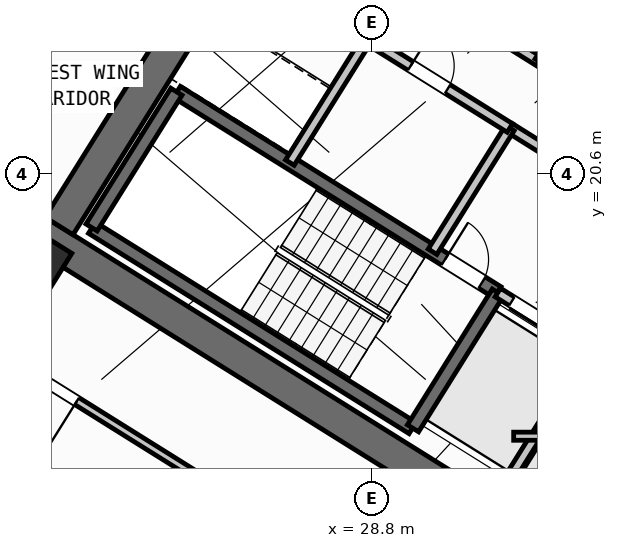
"""IFC4 building model, lengths in metres.
Left out: names, types, materials, properties, quantities, classifications, styles, units other than length and angle.
Written with IfcOpenShell. Run it as: python <this file> out.ifc"""

import sys

from ifc_helpers import new_model, si_unit, direction, frame, frame_2d, origin, origin_2d, place, context, subcontext, project, spatial, rectangle, hollow_rectangle, extrude, source, transform, mapped, element, fill, save


model = new_model("IFC4")
c1 = context("Model", 3, precision=1e-05, world=origin(), true_north=direction((0.0, 1.0)))
c2 = subcontext(c1, "Body", "Model", "MODEL_VIEW")
j1 = project(units=[si_unit("LENGTHUNIT", "METRE"), si_unit("PLANEANGLEUNIT", "RADIAN")], contexts=[c1])
p1 = place(None, origin())
s1 = spatial("IfcSite", under=j1, at=p1, CompositionType="ELEMENT")
p2 = place(p1, origin())
s2 = spatial("IfcBuilding", under=s1, at=p2, CompositionType="ELEMENT")
p3 = place(p2, frame((0.0, 0.0, 24.0)))
s3 = spatial("IfcBuildingStorey", under=s2, at=p3, CompositionType="ELEMENT", Elevation=24.0)
p4 = place(p3, frame((33.409, 12.45, 0.0), z_axis=(0.0, 0.0, 1.0), x_axis=(-0.848051132073, 0.529914405721, 0.0)))
e1 = element("IfcWall", 1, at=p4, inside=s3, PredefinedType="SHEAR", context=c2, shape_type="SweptSolid", body=[
    extrude(rectangle(XDim=13.24, YDim=0.65, at=frame_2d((6.62, 0.0))), origin(), (0.0, 0.0, 1.0), 3.35),
])
p5 = place(p3, frame((26.007, 24.976, 0.0), z_axis=(0.0, 0.0, 1.0), x_axis=(-0.529916319127, -0.848049936456, 0.0)))
e2 = element("IfcWall", 2, at=p5, inside=s3, PredefinedType="SHEAR", context=c2, shape_type="SweptSolid", body=[
    extrude(rectangle(XDim=6.375, YDim=0.65, at=frame_2d((3.188, 0.0))), origin(), (0.0, 0.0, 1.0), 3.35),
])
m1 = source(origin(), c2, "Body", "SweptSolid", [
    extrude(hollow_rectangle(XDim=1.0, YDim=1.0, WallThickness=0.04, at=origin_2d()), origin(), (0.0, 0.0, 1.0), 3.6),
])
p6 = place(p3, frame((22.191, 18.87, 0.0), z_axis=(0.0, 0.0, 1.0), x_axis=(-0.848048096156, 0.529919264233, 0.0)))
e3 = element("IfcColumn", 3, at=p6, inside=s3, PredefinedType="COLUMN", context=c2, shape_type="MappedRepresentation", body=[
    mapped(m1, transform((0.0, 0.0, 0.0), scale=1.0)),
])
p7 = place(p3, frame((29.268, 6.429, 0.0), z_axis=(0.0, 0.0, 1.0), x_axis=(-0.848049971435, 0.529916263149, 0.0)))
e4 = element("IfcWall", 4, at=p7, inside=s3, PredefinedType="STANDARD", context=c2, shape_type="SweptSolid", body=[
    extrude(rectangle(XDim=31.588, YDim=0.32, at=frame_2d((15.794, 0.0))), origin(), (0.0, 0.0, 1.0), 3.35),
])
p8 = place(p7, frame((15.901, 0.0, 0.0)))
e5 = element("IfcOpeningElement", 5, at=p8, cuts=e4, PredefinedType="OPENING", context=c2, shape_type="SweptSolid", body=[
    extrude(rectangle(XDim=1.2, YDim=2.15, at=frame_2d((0.6, 1.075))), frame((0.0, 0.17, 0.0), z_axis=(0.0, -1.0, 0.0), x_axis=(1.0, 0.0, 0.0)), (0.0, 0.0, 1.0), 0.34),
])
p9 = place(p7, frame((2.806, 0.0, 0.8)))
e6 = element("IfcOpeningElement", 6, at=p9, cuts=e4, PredefinedType="OPENING", context=c2, shape_type="SweptSolid", body=[
    extrude(rectangle(XDim=2.1, YDim=1.55, at=frame_2d((1.05, 0.775))), frame((0.0, 0.17, 0.0), z_axis=(0.0, -1.0, 0.0), x_axis=(1.0, 0.0, 0.0)), (0.0, 0.0, 1.0), 0.34),
])
p10 = place(p7, frame((7.481, 0.0, 0.8)))
e7 = element("IfcOpeningElement", 7, at=p10, cuts=e4, PredefinedType="OPENING", context=c2, shape_type="SweptSolid", body=[
    extrude(rectangle(XDim=2.1, YDim=1.55, at=frame_2d((1.05, 0.775))), frame((0.0, 0.17, 0.0), z_axis=(0.0, -1.0, 0.0), x_axis=(1.0, 0.0, 0.0)), (0.0, 0.0, 1.0), 0.34),
])
p11 = place(p7, frame((28.654, 0.0, 0.95)))
e8 = element("IfcOpeningElement", 8, at=p11, cuts=e4, PredefinedType="OPENING", context=c2, shape_type="SweptSolid", body=[
    extrude(rectangle(XDim=1.2, YDim=1.4, at=frame_2d((0.6, 0.7))), frame((0.0, 0.17, 0.0), z_axis=(0.0, -1.0, 0.0), x_axis=(1.0, 0.0, 0.0)), (0.0, 0.0, 1.0), 0.34),
])
p12 = place(p7, frame((19.11, 0.0, 1.0)))
e9 = element("IfcOpeningElement", 9, at=p12, cuts=e4, PredefinedType="OPENING", context=c2, shape_type="SweptSolid", body=[
    extrude(rectangle(XDim=0.9, YDim=1.25, at=frame_2d((0.45, 0.625))), frame((0.0, 0.17, 0.0), z_axis=(0.0, -1.0, 0.0), x_axis=(1.0, 0.0, 0.0)), (0.0, 0.0, 1.0), 0.34),
])
p13 = place(p7, frame((21.226, 0.0, 1.0)))
e10 = element("IfcOpeningElement", 10, at=p13, cuts=e4, PredefinedType="OPENING", context=c2, shape_type="SweptSolid", body=[
    extrude(rectangle(XDim=0.9, YDim=1.25, at=frame_2d((0.45, 0.625))), frame((0.0, 0.17, 0.0), z_axis=(0.0, -1.0, 0.0), x_axis=(1.0, 0.0, 0.0)), (0.0, 0.0, 1.0), 0.34),
])
p14 = place(p7, frame((23.014, 0.0, 1.0)))
e11 = element("IfcOpeningElement", 11, at=p14, cuts=e4, PredefinedType="OPENING", context=c2, shape_type="SweptSolid", body=[
    extrude(rectangle(XDim=0.9, YDim=1.25, at=frame_2d((0.45, 0.625))), frame((0.0, 0.17, 0.0), z_axis=(0.0, -1.0, 0.0), x_axis=(1.0, 0.0, 0.0)), (0.0, 0.0, 1.0), 0.34),
])
p15 = place(p7, frame((24.802, 0.0, 1.0)))
e12 = element("IfcOpeningElement", 12, at=p15, cuts=e4, PredefinedType="OPENING", context=c2, shape_type="SweptSolid", body=[
    extrude(rectangle(XDim=0.9, YDim=1.25, at=frame_2d((0.45, 0.625))), frame((0.0, 0.17, 0.0), z_axis=(0.0, -1.0, 0.0), x_axis=(1.0, 0.0, 0.0)), (0.0, 0.0, 1.0), 0.34),
])
p16 = place(p7, frame((26.59, 0.0, 1.0)))
e13 = element("IfcOpeningElement", 13, at=p16, cuts=e4, PredefinedType="OPENING", context=c2, shape_type="SweptSolid", body=[
    extrude(rectangle(XDim=0.9, YDim=1.25, at=frame_2d((0.45, 0.625))), frame((0.0, 0.17, 0.0), z_axis=(0.0, -1.0, 0.0), x_axis=(1.0, 0.0, 0.0)), (0.0, 0.0, 1.0), 0.34),
])
p17 = place(p3, frame((29.605, 15.581, 0.0), z_axis=(0.0, 0.0, 1.0), x_axis=(-0.848036911448, 0.529937163087, 0.0)))
e14 = element("IfcWall", 14, at=p17, inside=s3, PredefinedType="SHEAR", context=c2, shape_type="SweptSolid", body=[
    extrude(rectangle(XDim=7.46, YDim=0.26, at=frame_2d((3.73, 0.0))), origin(), (0.0, 0.0, 1.0), 3.35),
])
p18 = place(p3, frame((31.28, 18.261, 0.0), z_axis=(0.0, 0.0, 1.0), x_axis=(-0.848051618787, 0.529913626805, 0.0)))
e15 = element("IfcWall", 15, at=p18, inside=s3, PredefinedType="SHEAR", context=c2, shape_type="SweptSolid", body=[
    extrude(rectangle(XDim=7.46, YDim=0.26, at=frame_2d((3.73, 0.0))), origin(), (0.0, 0.0, 1.0), 3.35),
])
p19 = place(p18, frame((0.36, 0.0, 0.0)))
e16 = element("IfcOpeningElement", 16, at=p19, cuts=e15, PredefinedType="OPENING", context=c2, shape_type="SweptSolid", body=[
    extrude(rectangle(XDim=0.86, YDim=2.05, at=frame_2d((0.43, 1.025))), frame((0.0, 0.14, 0.0), z_axis=(0.0, -1.0, 0.0), x_axis=(1.0, 0.0, 0.0)), (0.0, 0.0, 1.0), 0.28),
])
p20 = place(p3, frame((31.288, 18.256, 0.0), z_axis=(0.0, 0.0, 1.0), x_axis=(-0.529943379326, -0.848033026897, 0.0)))
e17 = element("IfcWall", 17, at=p20, inside=s3, PredefinedType="SHEAR", context=c2, shape_type="SweptSolid", body=[
    extrude(rectangle(XDim=3.16, YDim=0.26, at=frame_2d((1.58, 0.0))), origin(), (0.0, 0.0, 1.0), 3.35),
])
p21 = place(p3, frame((24.945, 22.22, 0.0), z_axis=(0.0, 0.0, 1.0), x_axis=(-0.529908658664, -0.84805472316, 0.0)))
e18 = element("IfcWall", 18, at=p21, inside=s3, PredefinedType="SHEAR", context=c2, shape_type="SweptSolid", body=[
    extrude(rectangle(XDim=3.16, YDim=0.26, at=frame_2d((1.58, 0.0))), origin(), (0.0, 0.0, 1.0), 3.35),
])
p22 = place(p3, frame((38.046, 21.108, 0.0), z_axis=(0.0, 0.0, 1.0), x_axis=(-0.848054434086, 0.529909121291, 0.0)))
e19 = element("IfcWall", 19, at=p22, inside=s3, PredefinedType="SHEAR", context=c2, shape_type="SweptSolid", body=[
    extrude(rectangle(XDim=7.33, YDim=0.26, at=frame_2d((3.665, 0.0))), origin(), (0.0, 0.0, 1.0), 3.35),
])
p23 = place(p22, frame((0.22, 0.0, 0.0)))
e20 = element("IfcOpeningElement", 20, at=p23, cuts=e19, PredefinedType="OPENING", context=c2, shape_type="SweptSolid", body=[
    extrude(rectangle(XDim=1.1, YDim=2.1, at=frame_2d((0.55, 1.05))), frame((0.0, 0.14, 0.0), z_axis=(0.0, -1.0, 0.0), x_axis=(1.0, 0.0, 0.0)), (0.0, 0.0, 1.0), 0.28),
])
p24 = place(p3, frame((34.848, 16.031, 0.0), z_axis=(0.0, 0.0, 1.0), x_axis=(-0.848044042236, 0.529925751807, 0.0)))
e21 = element("IfcWall", 21, at=p24, inside=s3, PredefinedType="STANDARD", context=c2, shape_type="SweptSolid", body=[
    extrude(rectangle(XDim=4.198, YDim=0.2, at=frame_2d((2.099, 0.0))), origin(), (0.0, 0.0, 1.0), 3.34),
])
p25 = place(p24, frame((0.348, 0.0, 0.0)))
e22 = element("IfcOpeningElement", 22, at=p25, cuts=e21, PredefinedType="OPENING", context=c2, shape_type="SweptSolid", body=[
    extrude(rectangle(XDim=1.3, YDim=2.2, at=frame_2d((0.65, 1.1))), frame((0.0, 0.11, 0.0), z_axis=(0.0, -1.0, 0.0), x_axis=(1.0, 0.0, 0.0)), (0.0, 0.0, 1.0), 0.22),
])
p26 = place(p24, frame((2.423, 0.0, 0.0)))
e23 = element("IfcOpeningElement", 23, at=p26, cuts=e21, PredefinedType="OPENING", context=c2, shape_type="SweptSolid", body=[
    extrude(rectangle(XDim=1.45, YDim=2.25, at=frame_2d((0.725, 1.125))), frame((0.0, 0.11, 0.0), z_axis=(0.0, -1.0, 0.0), x_axis=(1.0, 0.0, 0.0)), (0.0, 0.0, 1.0), 0.22),
])
p27 = place(p3, frame((36.374, 18.474, 0.0), z_axis=(0.0, 0.0, 1.0), x_axis=(-0.848051071577, 0.529914502535, 0.0)))
e24 = element("IfcWall", 24, at=p27, inside=s3, PredefinedType="STANDARD", context=c2, shape_type="SweptSolid", body=[
    extrude(rectangle(XDim=5.718, YDim=0.2, at=frame_2d((2.859, 0.0))), origin(), (0.0, 0.0, 1.0), 3.34),
])
p28 = place(p27, frame((2.498, 0.0, 0.0)))
e25 = element("IfcOpeningElement", 25, at=p28, cuts=e24, PredefinedType="OPENING", context=c2, shape_type="SweptSolid", body=[
    extrude(rectangle(XDim=1.15, YDim=2.1, at=frame_2d((0.575, 1.05))), frame((0.0, 0.11, 0.0), z_axis=(0.0, -1.0, 0.0), x_axis=(1.0, 0.0, 0.0)), (0.0, 0.0, 1.0), 0.22),
])
p29 = place(p3, frame((32.108, 22.814, 0.0), z_axis=(0.0, 0.0, 1.0), x_axis=(-0.848042229521, 0.529928652696, 0.0)))
e26 = element("IfcWall", 26, at=p29, inside=s3, PredefinedType="STANDARD", context=c2, shape_type="SweptSolid", body=[
    extrude(rectangle(XDim=5.62, YDim=0.2, at=frame_2d((2.81, 0.0))), origin(), (0.0, 0.0, 1.0), 3.34),
])
p30 = place(p3, frame((32.982, 24.213, 0.0), z_axis=(0.0, 0.0, 1.0), x_axis=(-0.529839334948, -0.84809803628, 0.0)))
e27 = element("IfcWall", 27, at=p30, inside=s3, PredefinedType="STANDARD", context=c2, shape_type="SweptSolid", body=[
    extrude(rectangle(XDim=1.65, YDim=0.2, at=frame_2d((0.825, 0.0))), origin(), (0.0, 0.0, 1.0), 3.34),
])
p31 = place(p3, frame((33.029, 17.003, 0.0), z_axis=(0.0, 0.0, 1.0), x_axis=(-0.529916267533, -0.848049968695, 0.0)))
e28 = element("IfcWall", 28, at=p31, inside=s3, PredefinedType="STANDARD", context=c2, shape_type="SweptSolid", body=[
    extrude(rectangle(XDim=2.92, YDim=0.2, at=frame_2d((1.46, 0.0))), origin(), (0.0, 0.0, 1.0), 3.34),
])
for number, where, z_axis, x_axis in (
    (29, (31.525, 21.504, 0.0), (0.0, 0.0, 1.0), (-0.53, -0.848, 0.0)),
    (30, (28.71, 23.263, 0.0), (0.0, 0.0, 1.0), (-0.53, -0.848, 0.0)),
):
    element("IfcWall", number, at=place(p3, frame(where, z_axis=z_axis, x_axis=x_axis)), inside=s3, PredefinedType="STANDARD", context=c2, shape_type="SweptSolid", body=[
        extrude(rectangle(XDim=2.88, YDim=0.2, at=frame_2d((1.44, 0.0))), origin(), (0.0, 0.0, 1.0), 3.34),
    ])
p32 = place(p3, frame((31.525, 21.504, 0.0), z_axis=(0.0, 0.0, 1.0), x_axis=(-0.848044998614, 0.529924221305, 0.0)))
e31 = element("IfcWall", 31, at=p32, inside=s3, PredefinedType="STANDARD", context=c2, shape_type="SweptSolid", body=[
    extrude(rectangle(XDim=6.168, YDim=0.2, at=frame_2d((3.084, 0.0))), origin(), (0.0, 0.0, 1.0), 3.34),
])
p33 = place(p32, frame((4.4, 0.0, 0.0)))
e32 = element("IfcOpeningElement", 32, at=p33, cuts=e31, PredefinedType="OPENING", context=c2, shape_type="SweptSolid", body=[
    extrude(rectangle(XDim=0.86, YDim=2.05, at=frame_2d((0.43, 1.025))), frame((0.0, 0.11, 0.0), z_axis=(0.0, -1.0, 0.0), x_axis=(1.0, 0.0, 0.0)), (0.0, 0.0, 1.0), 0.22),
])
p34 = place(p32, frame((1.45, 0.0, 0.0)))
e33 = element("IfcOpeningElement", 33, at=p34, cuts=e31, PredefinedType="OPENING", context=c2, shape_type="SweptSolid", body=[
    extrude(rectangle(XDim=0.86, YDim=2.05, at=frame_2d((0.43, 1.025))), frame((0.0, 0.11, 0.0), z_axis=(0.0, -1.0, 0.0), x_axis=(1.0, 0.0, 0.0)), (0.0, 0.0, 1.0), 0.22),
])
p35 = place(p3, frame((24.588, 27.631, 0.0), z_axis=(0.0, 0.0, 1.0), x_axis=(-0.529914586043, -0.848051019396, 0.0)))
e34 = element("IfcWall", 34, at=p35, inside=s3, PredefinedType="PARTITIONING", context=c2, shape_type="SweptSolid", body=[
    extrude(rectangle(XDim=15.35, YDim=0.16, at=frame_2d((7.675, 0.0))), origin(), (0.0, 0.0, 1.0), 3.34),
])
p36 = place(p3, frame((32.164, 10.374, 0.0), z_axis=(0.0, 0.0, 1.0), x_axis=(-0.848044107957, 0.529925646633, 0.0)))
e35 = element("IfcWall", 35, at=p36, inside=s3, PredefinedType="PARTITIONING", context=c2, shape_type="SweptSolid", body=[
    extrude(rectangle(XDim=15.57, YDim=0.16, at=frame_2d((7.785, 0.0))), origin(), (0.0, 0.0, 1.0), 3.34),
])
p37 = place(p36, frame((10.83, 0.0, 0.0)))
e36 = element("IfcOpeningElement", 36, at=p37, cuts=e35, PredefinedType="OPENING", context=c2, shape_type="SweptSolid", body=[
    extrude(rectangle(XDim=1.0, YDim=2.1, at=frame_2d((0.5, 1.05))), frame((0.0, 0.09, 0.0), z_axis=(0.0, -1.0, 0.0), x_axis=(1.0, 0.0, 0.0)), (0.0, 0.0, 1.0), 0.18),
])
p38 = place(p3, frame((29.72, 8.859, 0.0), z_axis=(0.0, 0.0, 1.0), x_axis=(-0.848049134363, 0.529917602752, 0.0)))
e37 = element("IfcWall", 37, at=p38, inside=s3, PredefinedType="PLUMBINGWALL", context=c2, shape_type="SweptSolid", body=[
    extrude(rectangle(XDim=14.3, YDim=0.14, at=frame_2d((7.15, 0.0))), origin(), (0.0, 0.0, 1.0), 3.34),
])
p39 = place(p38, frame((9.57, 0.0, 0.0)))
e38 = element("IfcOpeningElement", 38, at=p39, cuts=e37, PredefinedType="OPENING", context=c2, shape_type="SweptSolid", body=[
    extrude(rectangle(XDim=0.92, YDim=2.08, at=frame_2d((0.46, 1.04))), frame((0.0, 0.08, 0.0), z_axis=(0.0, -1.0, 0.0), x_axis=(1.0, 0.0, 0.0)), (0.0, 0.0, 1.0), 0.16),
])
p40 = place(p3, frame((31.6, 15.42, 0.0), z_axis=(0.0, 0.0, 1.0), x_axis=(1.0, 0.0, 0.0)))
e39 = element("IfcWall", 39, at=p40, inside=s3, PredefinedType="PARTITIONING", context=c2, shape_type="SweptSolid", body=[
    extrude(rectangle(XDim=2.866, YDim=0.16, at=frame_2d((1.433, 0.0))), origin(), (0.0, 0.0, 1.0), 3.34),
])
m2 = source(origin(), c2, "Body", "SweptSolid", [
    extrude(rectangle(XDim=0.86, YDim=2.05, at=frame_2d((0.43, 1.025))), frame((0.0, 0.025, 0.0), z_axis=(0.0, -1.0, 0.0), x_axis=(1.0, 0.0, 0.0)), (0.0, 0.0, 1.0), 0.05),
])
p41 = place(p19, frame((0.86, 0.0, 0.0), z_axis=(0.0, 0.0, 1.0), x_axis=(-1.0, 0.0, 0.0)))
e40 = element("IfcDoor", 40, at=p41, inside=s3, OperationType="SINGLE_SWING_LEFT", PredefinedType="DOOR", context=c2, shape_type="MappedRepresentation", body=[
    mapped(m2, transform((0.0, 0.0, 0.0), scale=1.0)),
])
fill(e16, e40)
m3 = source(origin(), c2, "Body", "SweptSolid", [
    extrude(rectangle(XDim=1.45, YDim=2.25, at=frame_2d((0.725, 1.125))), frame((0.0, 0.025, 0.0), z_axis=(0.0, -1.0, 0.0), x_axis=(1.0, 0.0, 0.0)), (0.0, 0.0, 1.0), 0.05),
])
p42 = place(p26, origin())
e41 = element("IfcDoor", 41, at=p42, inside=s3, OperationType="DOUBLE_DOOR_SLIDING", PredefinedType="DOOR", context=c2, shape_type="MappedRepresentation", body=[
    mapped(m3, transform((0.0, 0.0, 0.0), scale=1.0)),
])
fill(e23, e41)
p43 = place(p34, frame((0.86, 0.0, 0.0), z_axis=(0.0, 0.0, 1.0), x_axis=(-1.0, 0.0, 0.0)))
e42 = element("IfcDoor", 42, at=p43, inside=s3, OperationType="SINGLE_SWING_LEFT", PredefinedType="DOOR", context=c2, shape_type="MappedRepresentation", body=[
    mapped(m2, transform((0.0, 0.0, 0.0), scale=1.0)),
])
fill(e33, e42)
m4 = source(origin(), c2, "Body", "SweptSolid", [
    extrude(rectangle(XDim=1.0, YDim=2.1, at=frame_2d((0.5, 1.05))), frame((0.0, 0.025, 0.0), z_axis=(0.0, -1.0, 0.0), x_axis=(1.0, 0.0, 0.0)), (0.0, 0.0, 1.0), 0.05),
])
p44 = place(p37, origin())
e43 = element("IfcDoor", 43, at=p44, inside=s3, OperationType="SINGLE_SWING_LEFT", PredefinedType="DOOR", context=c2, shape_type="MappedRepresentation", body=[
    mapped(m4, transform((0.0, 0.0, 0.0), scale=1.0)),
])
fill(e36, e43)
save(model, sys.argv[1])
